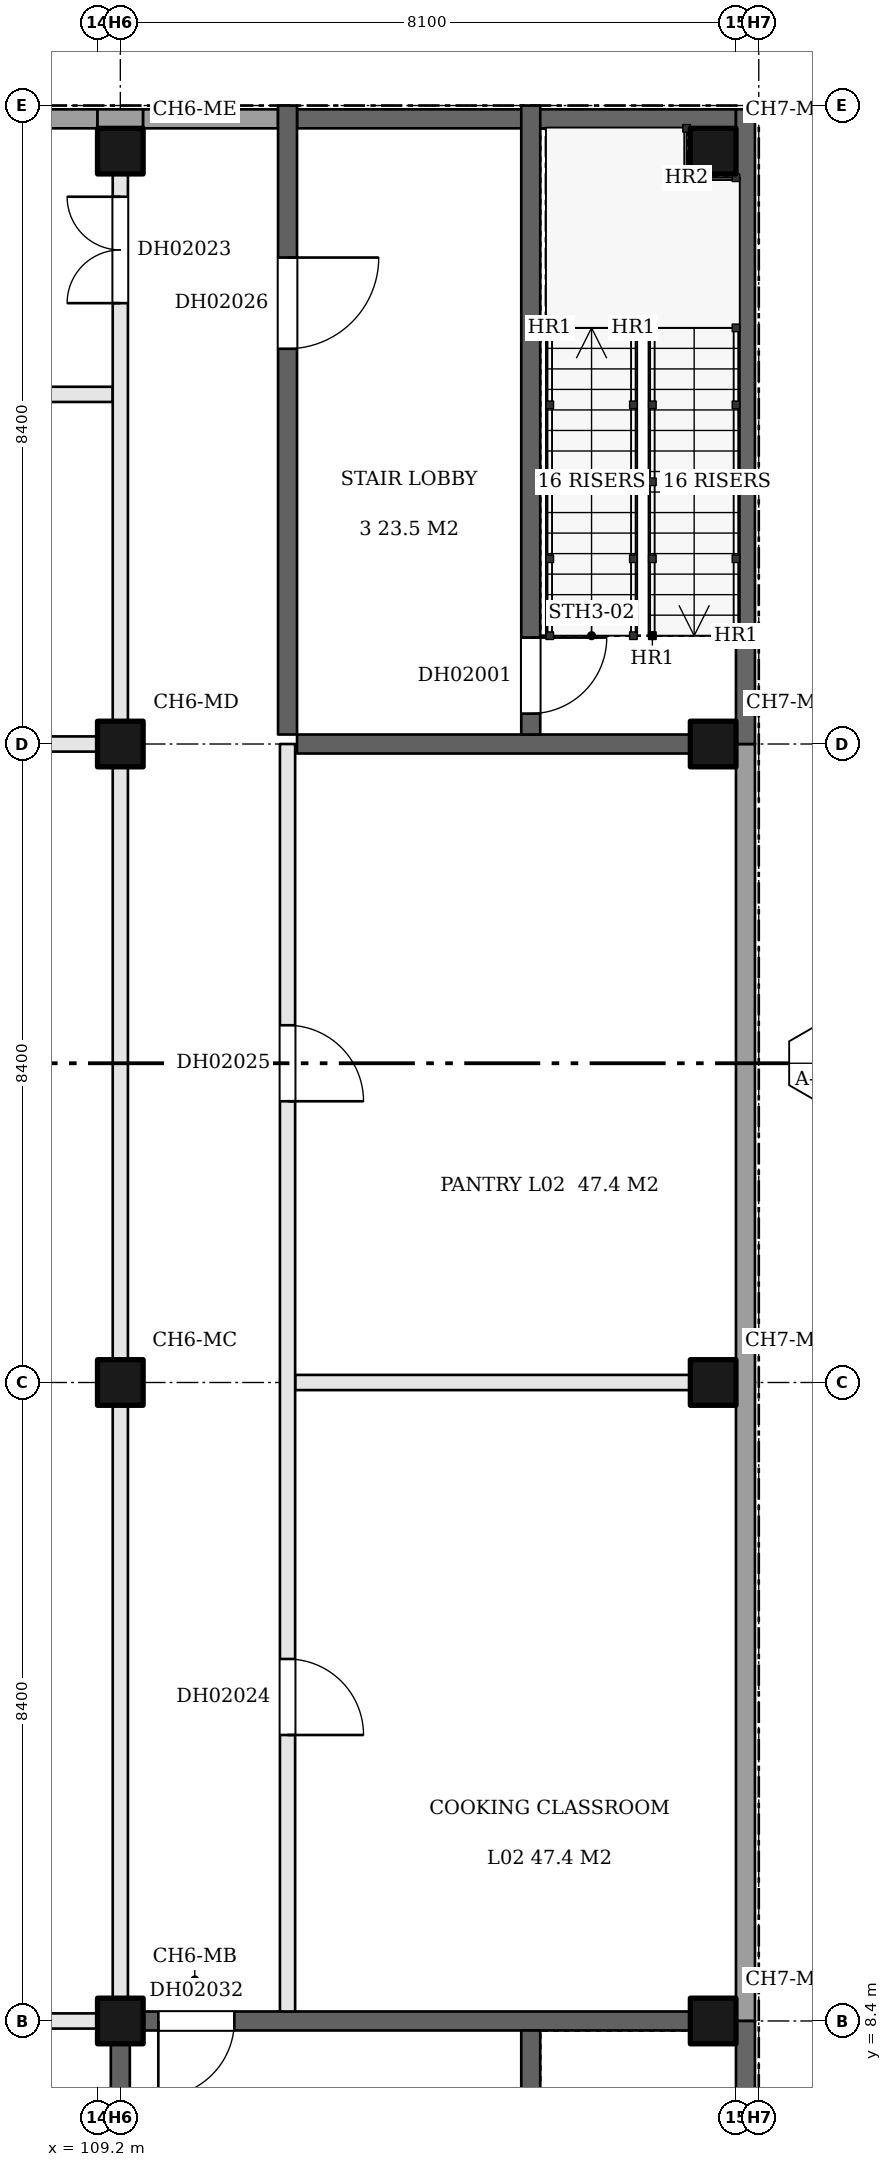
"""IFC4 building model, lengths in metres.
Left out: names, types, materials, properties, quantities, classifications, styles, units other than length and angle.
Written with IfcOpenShell. Run it as: python <this file> out.ifc"""

import sys

from ifc_helpers import new_model, si_unit, direction, frame, frame_2d, origin, origin_2d, place, context, subcontext, project, spatial, rectangle, extrude, element, fill, save


model = new_model("IFC4")
c1 = context("Model", 3, precision=1e-05, world=origin(), true_north=direction((0.0, 1.0)))
c2 = subcontext(c1, "Body", "Model", "MODEL_VIEW")
j1 = project(units=[si_unit("LENGTHUNIT", "METRE"), si_unit("PLANEANGLEUNIT", "RADIAN")], contexts=[c1])
p1 = place(None, origin())
s1 = spatial("IfcSite", under=j1, at=p1, CompositionType="ELEMENT")
p2 = place(p1, origin())
s2 = spatial("IfcBuilding", under=s1, at=p2, CompositionType="ELEMENT")
p3 = place(p2, frame((0.0, 0.0, 14.4)))
s3 = spatial("IfcBuildingStorey", under=s2, at=p3, CompositionType="ELEMENT", Elevation=14.4)
for number, where, z_axis, x_axis in (
    (1, (109.5, 8.4, 0.0), (0.0, 0.0, 1.0), (1.0, 0.0, 0.0)),
    (2, (109.5, 16.8, 0.0), (0.0, 0.0, 1.0), (1.0, 0.0, 0.0)),
    (3, (109.5, 25.2, 0.0), (0.0, 0.0, 1.0), (1.0, 0.0, 0.0)),
    (4, (109.5, 33.0, 0.0), (0.0, 0.0, 1.0), (1.0, 0.0, 0.0)),
    (5, (117.3, 8.4, 0.0), (0.0, 0.0, 1.0), (1.0, 0.0, 0.0)),
    (6, (117.3, 16.8, 0.0), (0.0, 0.0, 1.0), (1.0, 0.0, 0.0)),
    (7, (117.3, 25.2, 0.0), (0.0, 0.0, 1.0), (1.0, 0.0, 0.0)),
    (8, (117.3, 33.0, 0.0), (0.0, 0.0, 1.0), (1.0, 0.0, 0.0)),
):
    element("IfcColumn", number, at=place(p3, frame(where, z_axis=z_axis, x_axis=x_axis)), inside=s3, PredefinedType="COLUMN", context=c2, shape_type="SweptSolid", body=[
        extrude(rectangle(XDim=0.6, YDim=0.6, at=origin_2d()), origin(), (0.0, 0.0, 1.0), 5.1),
    ])
p4 = place(p3, frame((101.4, 8.4, 0.0), z_axis=(0.0, 0.0, 1.0), x_axis=(1.0, 0.0, 0.0)))
e9 = element("IfcWall", 9, at=p4, inside=s3, PredefinedType="PARTITIONING", context=c2, shape_type="SweptSolid", body=[
    extrude(rectangle(XDim=7.8, YDim=0.2, at=frame_2d((3.9, 0.0))), origin(), (0.0, 0.0, 1.0), 5.1),
])
p5 = place(p4, frame((2.2, 0.0, 0.0)))
e10 = element("IfcOpeningElement", 10, at=p5, cuts=e9, PredefinedType="OPENING", context=c2, shape_type="SweptSolid", body=[
    extrude(rectangle(XDim=1.0, YDim=2.1, at=frame_2d((0.5, 1.05))), frame((0.0, 0.11, 0.0), z_axis=(0.0, -1.0, 0.0), x_axis=(1.0, 0.0, 0.0)), (0.0, 0.0, 1.0), 0.22),
])
p6 = place(p4, frame((5.2, 0.0, 0.0)))
e11 = element("IfcOpeningElement", 11, at=p6, cuts=e9, PredefinedType="OPENING", context=c2, shape_type="SweptSolid", body=[
    extrude(rectangle(XDim=1.0, YDim=2.1, at=frame_2d((0.5, 1.05))), frame((0.0, 0.11, 0.0), z_axis=(0.0, -1.0, 0.0), x_axis=(1.0, 0.0, 0.0)), (0.0, 0.0, 1.0), 0.22),
])
p7 = place(p3, frame((109.8, 8.4, 0.0), z_axis=(0.0, 0.0, 1.0), x_axis=(1.0, 0.0, 0.0)))
e12 = element("IfcWall", 12, at=p7, inside=s3, PredefinedType="SHEAR", context=c2, shape_type="SweptSolid", body=[
    extrude(rectangle(XDim=7.2, YDim=0.25, at=frame_2d((3.6, 0.0))), origin(), (0.0, 0.0, 1.0), 5.1),
])
p8 = place(p7, frame((0.2, 0.0, 0.0)))
e13 = element("IfcOpeningElement", 13, at=p8, cuts=e12, PredefinedType="OPENING", context=c2, shape_type="SweptSolid", body=[
    extrude(rectangle(XDim=1.0, YDim=2.1, at=frame_2d((0.5, 1.05))), frame((0.0, 0.135, 0.0), z_axis=(0.0, -1.0, 0.0), x_axis=(1.0, 0.0, 0.0)), (0.0, 0.0, 1.0), 0.27),
])
p9 = place(p3, frame((111.8, 16.8, 0.0), z_axis=(0.0, 0.0, 1.0), x_axis=(1.0, 0.0, 0.0)))
e14 = element("IfcWall", 14, at=p9, inside=s3, PredefinedType="PARTITIONING", context=c2, shape_type="SweptSolid", body=[
    extrude(rectangle(XDim=5.2, YDim=0.2, at=frame_2d((2.6, 0.0))), origin(), (0.0, 0.0, 1.0), 5.1),
])
p10 = place(p3, frame((101.4, 25.2, 0.0), z_axis=(0.0, 0.0, 1.0), x_axis=(1.0, 0.0, 0.0)))
e15 = element("IfcWall", 15, at=p10, inside=s3, PredefinedType="PARTITIONING", context=c2, shape_type="SweptSolid", body=[
    extrude(rectangle(XDim=7.8, YDim=0.2, at=frame_2d((3.9, 0.0))), origin(), (0.0, 0.0, 1.0), 5.1),
])
p11 = place(p3, frame((111.825, 25.2, 0.0), z_axis=(0.0, 0.0, 1.0), x_axis=(1.0, 0.0, 0.0)))
e16 = element("IfcWall", 16, at=p11, inside=s3, PredefinedType="SHEAR", context=c2, shape_type="SweptSolid", body=[
    extrude(rectangle(XDim=5.175, YDim=0.25, at=frame_2d((2.587, 0.0))), origin(), (0.0, 0.0, 1.0), 5.1),
])
p12 = place(p3, frame((76.025, 29.8, 0.0), z_axis=(0.0, 0.0, 1.0), x_axis=(1.0, 0.0, 0.0)))
e17 = element("IfcWall", 17, at=p12, inside=s3, PredefinedType="PARTITIONING", context=c2, shape_type="SweptSolid", body=[
    extrude(rectangle(XDim=33.375, YDim=0.2, at=frame_2d((16.688, 0.0))), origin(), (0.0, 0.0, 1.0), 5.1),
])
p13 = place(p12, frame((1.538, 0.0, 0.0)))
e18 = element("IfcOpeningElement", 18, at=p13, cuts=e17, PredefinedType="OPENING", context=c2, shape_type="SweptSolid", body=[
    extrude(rectangle(XDim=1.0, YDim=2.1, at=frame_2d((0.5, 1.05))), frame((0.0, 0.11, 0.0), z_axis=(0.0, -1.0, 0.0), x_axis=(1.0, 0.0, 0.0)), (0.0, 0.0, 1.0), 0.22),
])
p14 = place(p12, frame((5.675, 0.0, 0.0)))
e19 = element("IfcOpeningElement", 19, at=p14, cuts=e17, PredefinedType="OPENING", context=c2, shape_type="SweptSolid", body=[
    extrude(rectangle(XDim=1.0, YDim=2.1, at=frame_2d((0.5, 1.05))), frame((0.0, 0.11, 0.0), z_axis=(0.0, -1.0, 0.0), x_axis=(1.0, 0.0, 0.0)), (0.0, 0.0, 1.0), 0.22),
])
p15 = place(p12, frame((9.175, 0.0, 0.0)))
e20 = element("IfcOpeningElement", 20, at=p15, cuts=e17, PredefinedType="OPENING", context=c2, shape_type="SweptSolid", body=[
    extrude(rectangle(XDim=1.0, YDim=2.1, at=frame_2d((0.5, 1.05))), frame((0.0, 0.11, 0.0), z_axis=(0.0, -1.0, 0.0), x_axis=(1.0, 0.0, 0.0)), (0.0, 0.0, 1.0), 0.22),
])
p16 = place(p12, frame((14.775, 0.0, 0.0)))
e21 = element("IfcOpeningElement", 21, at=p16, cuts=e17, PredefinedType="OPENING", context=c2, shape_type="SweptSolid", body=[
    extrude(rectangle(XDim=1.0, YDim=2.1, at=frame_2d((0.5, 1.05))), frame((0.0, 0.11, 0.0), z_axis=(0.0, -1.0, 0.0), x_axis=(1.0, 0.0, 0.0)), (0.0, 0.0, 1.0), 0.22),
])
p17 = place(p12, frame((22.475, 0.0, 0.0)))
e22 = element("IfcOpeningElement", 22, at=p17, cuts=e17, PredefinedType="OPENING", context=c2, shape_type="SweptSolid", body=[
    extrude(rectangle(XDim=1.0, YDim=2.1, at=frame_2d((0.5, 1.05))), frame((0.0, 0.11, 0.0), z_axis=(0.0, -1.0, 0.0), x_axis=(1.0, 0.0, 0.0)), (0.0, 0.0, 1.0), 0.22),
])
p18 = place(p12, frame((29.475, 0.0, 0.0)))
e23 = element("IfcOpeningElement", 23, at=p18, cuts=e17, PredefinedType="OPENING", context=c2, shape_type="SweptSolid", body=[
    extrude(rectangle(XDim=1.0, YDim=2.1, at=frame_2d((0.5, 1.05))), frame((0.0, 0.11, 0.0), z_axis=(0.0, -1.0, 0.0), x_axis=(1.0, 0.0, 0.0)), (0.0, 0.0, 1.0), 0.22),
])
p19 = place(p3, frame((101.4, 33.425, 0.0), z_axis=(0.0, 0.0, 1.0), x_axis=(1.0, 0.0, 0.0)))
e24 = element("IfcWall", 24, at=p19, inside=s3, PredefinedType="SOLIDWALL", context=c2, shape_type="SweptSolid", body=[
    extrude(rectangle(XDim=7.8, YDim=0.25, at=frame_2d((3.9, 0.0))), origin(), (0.0, 0.0, 1.0), 5.1),
])
p20 = place(p19, frame((0.75, 0.0, 0.9)))
e25 = element("IfcOpeningElement", 25, at=p20, cuts=e24, PredefinedType="OPENING", context=c2, shape_type="SweptSolid", body=[
    extrude(rectangle(XDim=2.4, YDim=1.5, at=frame_2d((1.2, 0.75))), frame((0.0, 0.135, 0.0), z_axis=(0.0, -1.0, 0.0), x_axis=(1.0, 0.0, 0.0)), (0.0, 0.0, 1.0), 0.27),
])
p21 = place(p19, frame((4.65, 0.0, 0.9)))
e26 = element("IfcOpeningElement", 26, at=p21, cuts=e24, PredefinedType="OPENING", context=c2, shape_type="SweptSolid", body=[
    extrude(rectangle(XDim=2.4, YDim=1.5, at=frame_2d((1.2, 0.75))), frame((0.0, 0.135, 0.0), z_axis=(0.0, -1.0, 0.0), x_axis=(1.0, 0.0, 0.0)), (0.0, 0.0, 1.0), 0.27),
])
p22 = place(p3, frame((109.2, 33.425, 0.0), z_axis=(0.0, 0.0, 1.0), x_axis=(1.0, 0.0, 0.0)))
e27 = element("IfcWall", 27, at=p22, inside=s3, PredefinedType="SOLIDWALL", context=c2, shape_type="SweptSolid", body=[
    extrude(rectangle(XDim=0.6, YDim=0.25, at=frame_2d((0.3, 0.0))), origin(), (0.0, 0.0, 1.0), 5.1),
])
p23 = place(p3, frame((109.8, 33.425, 0.0), z_axis=(0.0, 0.0, 1.0), x_axis=(1.0, 0.0, 0.0)))
e28 = element("IfcWall", 28, at=p23, inside=s3, PredefinedType="SOLIDWALL", context=c2, shape_type="SweptSolid", body=[
    extrude(rectangle(XDim=1.775, YDim=0.25, at=frame_2d((0.887, 0.0))), origin(), (0.0, 0.0, 1.0), 5.1),
])
p24 = place(p3, frame((111.825, 33.425, 0.0), z_axis=(0.0, 0.0, 1.0), x_axis=(1.0, 0.0, 0.0)))
e29 = element("IfcWall", 29, at=p24, inside=s3, PredefinedType="SHEAR", context=c2, shape_type="SweptSolid", body=[
    extrude(rectangle(XDim=5.775, YDim=0.25, at=frame_2d((2.888, 0.0))), origin(), (0.0, 0.0, 1.0), 5.1),
])
p25 = place(p3, frame((109.5, 0.9, 0.0), z_axis=(0.0, 0.0, 1.0), x_axis=(0.0, 1.0, 0.0)))
e30 = element("IfcWall", 30, at=p25, inside=s3, PredefinedType="SHEAR", context=c2, shape_type="SweptSolid", body=[
    extrude(rectangle(XDim=7.2, YDim=0.25, at=frame_2d((3.6, 0.0))), origin(), (0.0, 0.0, 1.0), 5.1),
])
p26 = place(p25, frame((4.3, 0.0, 0.0)))
e31 = element("IfcOpeningElement", 31, at=p26, cuts=e30, PredefinedType="OPENING", context=c2, shape_type="SweptSolid", body=[
    extrude(rectangle(XDim=1.4, YDim=2.1, at=frame_2d((0.7, 1.05))), frame((0.0, 0.135, 0.0), z_axis=(0.0, -1.0, 0.0), x_axis=(1.0, 0.0, 0.0)), (0.0, 0.0, 1.0), 0.27),
])
p27 = place(p3, frame((109.5, 8.7, 0.0), z_axis=(0.0, 0.0, 1.0), x_axis=(0.0, 1.0, 0.0)))
e32 = element("IfcWall", 32, at=p27, inside=s3, PredefinedType="PARTITIONING", context=c2, shape_type="SweptSolid", body=[
    extrude(rectangle(XDim=7.8, YDim=0.2, at=frame_2d((3.9, 0.0))), origin(), (0.0, 0.0, 1.0), 5.1),
])
p28 = place(p3, frame((109.5, 17.1, 0.0), z_axis=(0.0, 0.0, 1.0), x_axis=(0.0, 1.0, 0.0)))
e33 = element("IfcWall", 33, at=p28, inside=s3, PredefinedType="PARTITIONING", context=c2, shape_type="SweptSolid", body=[
    extrude(rectangle(XDim=7.8, YDim=0.2, at=frame_2d((3.9, 0.0))), origin(), (0.0, 0.0, 1.0), 5.1),
])
p29 = place(p3, frame((109.5, 25.5, 0.0), z_axis=(0.0, 0.0, 1.0), x_axis=(0.0, 1.0, 0.0)))
e34 = element("IfcWall", 34, at=p29, inside=s3, PredefinedType="PARTITIONING", context=c2, shape_type="SweptSolid", body=[
    extrude(rectangle(XDim=7.2, YDim=0.2, at=frame_2d((3.6, 0.0))), origin(), (0.0, 0.0, 1.0), 5.1),
])
p30 = place(p29, frame((5.5, 0.0, 0.0)))
e35 = element("IfcOpeningElement", 35, at=p30, cuts=e34, PredefinedType="OPENING", context=c2, shape_type="SweptSolid", body=[
    extrude(rectangle(XDim=1.4, YDim=2.1, at=frame_2d((0.7, 1.05))), frame((0.0, 0.11, 0.0), z_axis=(0.0, -1.0, 0.0), x_axis=(1.0, 0.0, 0.0)), (0.0, 0.0, 1.0), 0.22),
])
p31 = place(p3, frame((111.7, 8.525, 0.0), z_axis=(0.0, 0.0, 1.0), x_axis=(0.0, 1.0, 0.0)))
e36 = element("IfcWall", 36, at=p31, inside=s3, PredefinedType="PARTITIONING", context=c2, shape_type="SweptSolid", body=[
    extrude(rectangle(XDim=16.675, YDim=0.2, at=frame_2d((8.337, 0.0))), origin(), (0.0, 0.0, 1.0), 5.1),
])
p32 = place(p31, frame((3.637, 0.0, 0.0)))
e37 = element("IfcOpeningElement", 37, at=p32, cuts=e36, PredefinedType="OPENING", context=c2, shape_type="SweptSolid", body=[
    extrude(rectangle(XDim=1.0, YDim=2.1, at=frame_2d((0.5, 1.05))), frame((0.0, 0.11, 0.0), z_axis=(0.0, -1.0, 0.0), x_axis=(1.0, 0.0, 0.0)), (0.0, 0.0, 1.0), 0.22),
])
p33 = place(p31, frame((11.975, 0.0, 0.0)))
e38 = element("IfcOpeningElement", 38, at=p33, cuts=e36, PredefinedType="OPENING", context=c2, shape_type="SweptSolid", body=[
    extrude(rectangle(XDim=1.0, YDim=2.1, at=frame_2d((0.5, 1.05))), frame((0.0, 0.11, 0.0), z_axis=(0.0, -1.0, 0.0), x_axis=(1.0, 0.0, 0.0)), (0.0, 0.0, 1.0), 0.22),
])
p34 = place(p3, frame((111.7, 25.325, 0.0), z_axis=(0.0, 0.0, 1.0), x_axis=(0.0, 1.0, 0.0)))
e39 = element("IfcWall", 39, at=p34, inside=s3, PredefinedType="SHEAR", context=c2, shape_type="SweptSolid", body=[
    extrude(rectangle(XDim=8.275, YDim=0.25, at=frame_2d((4.138, 0.0))), origin(), (0.0, 0.0, 1.0), 5.1),
])
p35 = place(p34, frame((5.075, 0.0, 0.0)))
e40 = element("IfcOpeningElement", 40, at=p35, cuts=e39, PredefinedType="OPENING", context=c2, shape_type="SweptSolid", body=[
    extrude(rectangle(XDim=1.2, YDim=2.1, at=frame_2d((0.6, 1.05))), frame((0.0, 0.135, 0.0), z_axis=(0.0, -1.0, 0.0), x_axis=(1.0, 0.0, 0.0)), (0.0, 0.0, 1.0), 0.27),
])
p36 = place(p3, frame((114.9, 3.125, 0.0), z_axis=(0.0, 0.0, 1.0), x_axis=(0.0, 1.0, 0.0)))
e41 = element("IfcWall", 41, at=p36, inside=s3, PredefinedType="SHEAR", context=c2, shape_type="SweptSolid", body=[
    extrude(rectangle(XDim=5.15, YDim=0.25, at=frame_2d((2.575, 0.0))), origin(), (0.0, 0.0, 1.0), 5.1),
])
p37 = place(p36, frame((3.075, 0.0, 0.0)))
e42 = element("IfcOpeningElement", 42, at=p37, cuts=e41, PredefinedType="OPENING", context=c2, shape_type="SweptSolid", body=[
    extrude(rectangle(XDim=1.1, YDim=2.1, at=frame_2d((0.55, 1.05))), frame((0.0, 0.135, 0.0), z_axis=(0.0, -1.0, 0.0), x_axis=(1.0, 0.0, 0.0)), (0.0, 0.0, 1.0), 0.27),
])
p38 = place(p36, frame((0.475, 0.0, 0.0)))
e43 = element("IfcOpeningElement", 43, at=p38, cuts=e41, PredefinedType="OPENING", context=c2, shape_type="SweptSolid", body=[
    extrude(rectangle(XDim=0.9, YDim=2.1, at=frame_2d((0.45, 1.05))), frame((0.0, 0.135, 0.0), z_axis=(0.0, -1.0, 0.0), x_axis=(1.0, 0.0, 0.0)), (0.0, 0.0, 1.0), 0.27),
])
p39 = place(p3, frame((114.9, 25.325, 0.0), z_axis=(0.0, 0.0, 1.0), x_axis=(0.0, 1.0, 0.0)))
e44 = element("IfcWall", 44, at=p39, inside=s3, PredefinedType="SHEAR", context=c2, shape_type="SweptSolid", body=[
    extrude(rectangle(XDim=8.275, YDim=0.25, at=frame_2d((4.138, 0.0))), origin(), (0.0, 0.0, 1.0), 5.1),
])
p40 = place(p39, frame((0.275, 0.0, 0.0)))
e45 = element("IfcOpeningElement", 45, at=p40, cuts=e44, PredefinedType="OPENING", context=c2, shape_type="SweptSolid", body=[
    extrude(rectangle(XDim=1.0, YDim=2.1, at=frame_2d((0.5, 1.05))), frame((0.0, 0.135, 0.0), z_axis=(0.0, -1.0, 0.0), x_axis=(1.0, 0.0, 0.0)), (0.0, 0.0, 1.0), 0.27),
])
p41 = place(p3, frame((117.725, 0.05, 0.0), z_axis=(0.0, 0.0, 1.0), x_axis=(0.0, 1.0, 0.0)))
e46 = element("IfcWall", 46, at=p41, inside=s3, PredefinedType="SHEAR", context=c2, shape_type="SweptSolid", body=[
    extrude(rectangle(XDim=8.35, YDim=0.25, at=frame_2d((4.175, 0.0))), origin(), (0.0, 0.0, 1.0), 5.1),
])
p42 = place(p3, frame((117.725, 8.4, 0.0), z_axis=(0.0, 0.0, 1.0), x_axis=(0.0, 1.0, 0.0)))
e47 = element("IfcWall", 47, at=p42, inside=s3, PredefinedType="SOLIDWALL", context=c2, shape_type="SweptSolid", body=[
    extrude(rectangle(XDim=16.8, YDim=0.25, at=frame_2d((8.4, 0.0))), origin(), (0.0, 0.0, 1.0), 5.1),
])
p43 = place(p3, frame((117.725, 25.2, 0.0), z_axis=(0.0, 0.0, 1.0), x_axis=(0.0, 1.0, 0.0)))
e48 = element("IfcWall", 48, at=p43, inside=s3, PredefinedType="SHEAR", context=c2, shape_type="SweptSolid", body=[
    extrude(rectangle(XDim=8.35, YDim=0.25, at=frame_2d((4.175, 0.0))), origin(), (0.0, 0.0, 1.0), 5.1),
])
p44 = place(p40, frame((1.0, 0.0, 0.0), z_axis=(0.0, 0.0, 1.0), x_axis=(-1.0, 0.0, 0.0)))
e49 = element("IfcDoor", 49, at=p44, inside=s3, OperationType="SINGLE_SWING_LEFT", PredefinedType="DOOR", context=c2, shape_type="SweptSolid", body=[
    extrude(rectangle(XDim=1.0, YDim=2.1, at=frame_2d((0.5, 1.05))), frame((0.0, 0.025, 0.0), z_axis=(0.0, -1.0, 0.0), x_axis=(1.0, 0.0, 0.0)), (0.0, 0.0, 1.0), 0.05),
])
fill(e45, e49)
p45 = place(p30, origin())
e50 = element("IfcDoor", 50, at=p45, inside=s3, OperationType="DOUBLE_DOOR_SINGLE_SWING", PredefinedType="DOOR", context=c2, shape_type="SweptSolid", body=[
    extrude(rectangle(XDim=1.4, YDim=2.1, at=frame_2d((0.7, 1.05))), frame((0.0, 0.025, 0.0), z_axis=(0.0, -1.0, 0.0), x_axis=(1.0, 0.0, 0.0)), (0.0, 0.0, 1.0), 0.05),
])
fill(e35, e50)
p46 = place(p32, frame((1.0, 0.0, 0.0), z_axis=(0.0, 0.0, 1.0), x_axis=(-1.0, 0.0, 0.0)))
e51 = element("IfcDoor", 51, at=p46, inside=s3, OperationType="SINGLE_SWING_RIGHT", PredefinedType="DOOR", context=c2, shape_type="SweptSolid", body=[
    extrude(rectangle(XDim=1.0, YDim=2.1, at=frame_2d((0.5, 1.05))), frame((0.0, 0.025, 0.0), z_axis=(0.0, -1.0, 0.0), x_axis=(1.0, 0.0, 0.0)), (0.0, 0.0, 1.0), 0.05),
])
fill(e37, e51)
p47 = place(p33, frame((1.0, 0.0, 0.0), z_axis=(0.0, 0.0, 1.0), x_axis=(-1.0, 0.0, 0.0)))
e52 = element("IfcDoor", 52, at=p47, inside=s3, OperationType="SINGLE_SWING_RIGHT", PredefinedType="DOOR", context=c2, shape_type="SweptSolid", body=[
    extrude(rectangle(XDim=1.0, YDim=2.1, at=frame_2d((0.5, 1.05))), frame((0.0, 0.025, 0.0), z_axis=(0.0, -1.0, 0.0), x_axis=(1.0, 0.0, 0.0)), (0.0, 0.0, 1.0), 0.05),
])
fill(e38, e52)
p48 = place(p35, frame((1.2, 0.0, 0.0), z_axis=(0.0, 0.0, 1.0), x_axis=(-1.0, 0.0, 0.0)))
e53 = element("IfcDoor", 53, at=p48, inside=s3, OperationType="SINGLE_SWING_LEFT", PredefinedType="DOOR", context=c2, shape_type="SweptSolid", body=[
    extrude(rectangle(XDim=1.2, YDim=2.1, at=frame_2d((0.6, 1.05))), frame((0.0, 0.025, 0.0), z_axis=(0.0, -1.0, 0.0), x_axis=(1.0, 0.0, 0.0)), (0.0, 0.0, 1.0), 0.05),
])
fill(e40, e53)
p49 = place(p8, frame((1.0, 0.0, 0.0), z_axis=(0.0, 0.0, 1.0), x_axis=(-1.0, 0.0, 0.0)))
e54 = element("IfcDoor", 54, at=p49, inside=s3, OperationType="SINGLE_SWING_RIGHT", PredefinedType="DOOR", context=c2, shape_type="SweptSolid", body=[
    extrude(rectangle(XDim=1.0, YDim=2.1, at=frame_2d((0.5, 1.05))), frame((0.0, 0.025, 0.0), z_axis=(0.0, -1.0, 0.0), x_axis=(1.0, 0.0, 0.0)), (0.0, 0.0, 1.0), 0.05),
])
fill(e13, e54)
save(model, sys.argv[1])
